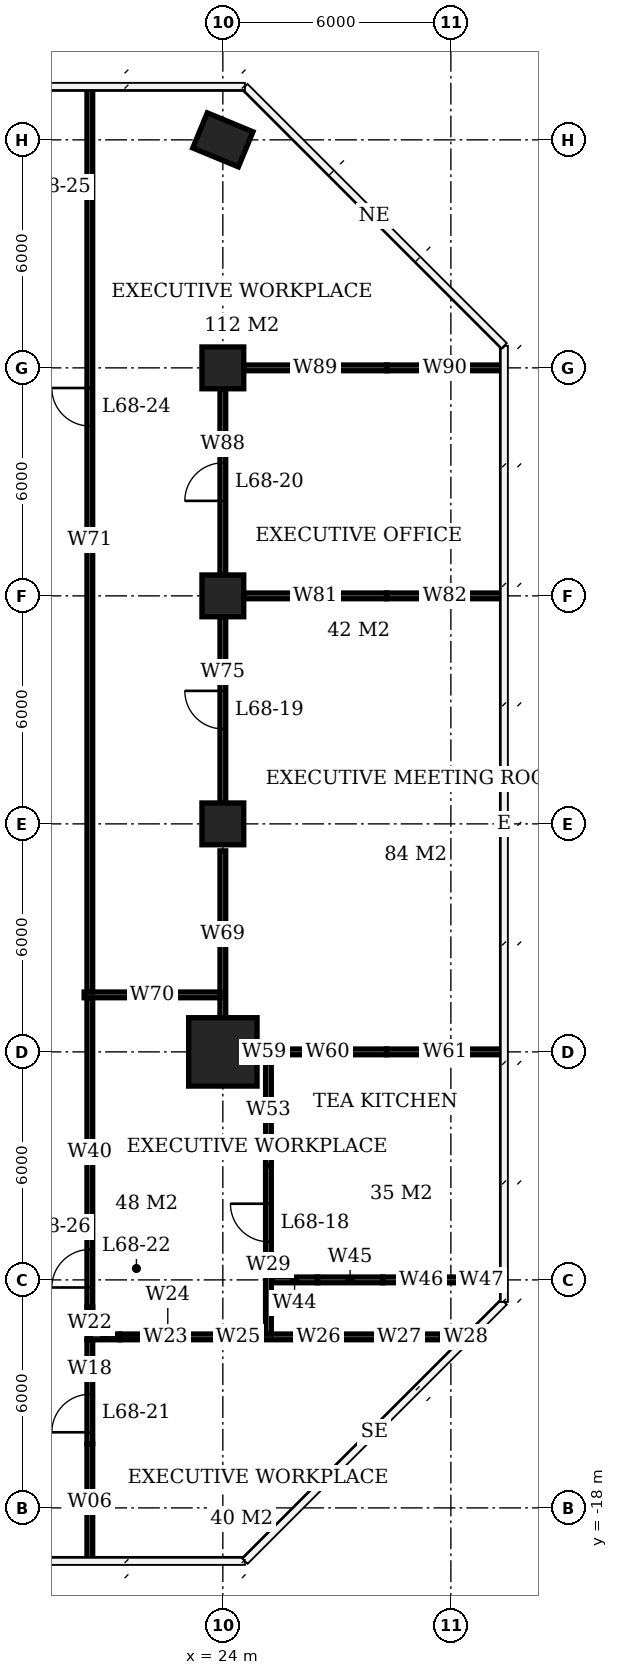
"""IFC4 building model, lengths in metres.
Left out: names, types, materials, properties, quantities, classifications, styles, units other than length and angle.
Written with IfcOpenShell. Run it as: python <this file> out.ifc"""

import sys

from ifc_helpers import new_model, si_unit, direction, frame, frame_2d, origin, origin_2d, place, context, subcontext, project, spatial, rectangle, extrude, element, fill, save


model = new_model("IFC4")
c1 = context("Model", 3, precision=1e-05, world=origin(), true_north=direction((0.0, 1.0)))
c2 = subcontext(c1, "Body", "Model", "MODEL_VIEW")
j1 = project(units=[si_unit("LENGTHUNIT", "METRE"), si_unit("PLANEANGLEUNIT", "RADIAN")], contexts=[c1])
p1 = place(None, origin())
s1 = spatial("IfcSite", under=j1, at=p1, CompositionType="ELEMENT")
p2 = place(p1, origin())
s2 = spatial("IfcBuilding", under=s1, at=p2, CompositionType="ELEMENT")
p3 = place(p2, frame((0.0, 0.0, 276.2)))
s3 = spatial("IfcBuildingStorey", under=s2, at=p3, CompositionType="ELEMENT", Elevation=276.2)
p4 = place(p3, frame((24.0, -6.0, 0.0), z_axis=(0.0, 0.0, 1.0), x_axis=(1.0, 0.0, 0.0)))
e1 = element("IfcColumn", 1, at=p4, inside=s3, PredefinedType="COLUMN", context=c2, shape_type="SweptSolid", body=[
    extrude(rectangle(XDim=1.8, YDim=1.8, at=origin_2d()), origin(), (0.0, 0.0, 1.0), 3.9),
])
for number, where, z_axis, x_axis in (
    (2, (24.0, 0.0, 0.0), (0.0, 0.0, 1.0), (1.0, 0.0, 0.0)),
    (3, (24.0, 6.0, 0.0), (0.0, 0.0, 1.0), (1.0, 0.0, 0.0)),
    (4, (24.0, 12.0, 0.0), (0.0, 0.0, 1.0), (1.0, 0.0, 0.0)),
):
    element("IfcColumn", number, at=place(p3, frame(where, z_axis=z_axis, x_axis=x_axis)), inside=s3, PredefinedType="COLUMN", context=c2, shape_type="SweptSolid", body=[
        extrude(rectangle(XDim=1.1, YDim=1.1, at=origin_2d()), origin(), (0.0, 0.0, 1.0), 3.9),
    ])
p5 = place(p3, frame((24.0, 18.0, 0.0), z_axis=(0.0, 0.0, 1.0), x_axis=(0.923879532511, -0.382683432365, 0.0)))
e5 = element("IfcColumn", 5, at=p5, inside=s3, PredefinedType="COLUMN", context=c2, shape_type="SweptSolid", body=[
    extrude(rectangle(XDim=1.3, YDim=1.0, at=origin_2d()), origin(), (0.0, 0.0, 1.0), 3.9),
])
p6 = place(p3, frame((25.285, -12.0, 0.0), z_axis=(0.0, 0.0, 1.0), x_axis=(1.0, 0.0, 0.0)))
e6 = element("IfcWall", 6, at=p6, inside=s3, PredefinedType="PARTITIONING", context=c2, shape_type="SweptSolid", body=[
    extrude(rectangle(XDim=1.205, YDim=0.15, at=frame_2d((0.603, 0.0))), origin(), (0.0, 0.0, 1.0), 2.65),
])
p7 = place(p3, frame((26.49, -12.0, 0.0), z_axis=(0.0, 0.0, 1.0), x_axis=(1.0, 0.0, 0.0)))
e7 = element("IfcWall", 7, at=p7, inside=s3, PredefinedType="PARTITIONING", context=c2, shape_type="SweptSolid", body=[
    extrude(rectangle(XDim=1.718, YDim=0.15, at=frame_2d((0.859, 0.0))), origin(), (0.0, 0.0, 1.0), 3.65),
])
p8 = place(p3, frame((28.208, -12.0, 0.0), z_axis=(0.0, 0.0, 1.0), x_axis=(1.0, 0.0, 0.0)))
e8 = element("IfcWall", 8, at=p8, inside=s3, PredefinedType="PARTITIONING", context=c2, shape_type="SweptSolid", body=[
    extrude(rectangle(XDim=2.029, YDim=0.15, at=frame_2d((1.015, 0.0))), origin(), (0.0, 0.0, 1.0), 2.65),
])
p9 = place(p3, frame((30.237, -12.0, 0.0), z_axis=(0.0, 0.0, 1.0), x_axis=(1.0, 0.0, 0.0)))
e9 = element("IfcWall", 9, at=p9, inside=s3, PredefinedType="PARTITIONING", context=c2, shape_type="SweptSolid", body=[
    extrude(rectangle(XDim=1.138, YDim=0.15, at=frame_2d((0.569, 0.0))), origin(), (0.0, 0.0, 1.0), 3.65),
])
p10 = place(p3, frame((24.9, -6.0, 0.0), z_axis=(0.0, 0.0, 1.0), x_axis=(1.0, 0.0, 0.0)))
e10 = element("IfcWall", 10, at=p10, inside=s3, PredefinedType="PARTITIONING", context=c2, shape_type="SweptSolid", body=[
    extrude(rectangle(XDim=0.375, YDim=0.15, at=frame_2d((0.188, 0.0))), origin(), (0.0, 0.0, 1.0), 2.65),
])
p11 = place(p3, frame((25.2, -6.0, 0.0), z_axis=(0.0, 0.0, 1.0), x_axis=(1.0, 0.0, 0.0)))
e11 = element("IfcWall", 11, at=p11, inside=s3, PredefinedType="PARTITIONING", context=c2, shape_type="SweptSolid", body=[
    extrude(rectangle(XDim=3.11, YDim=0.15, at=frame_2d((1.555, 0.0))), origin(), (0.0, 0.0, 1.0), 2.65),
])
p12 = place(p3, frame((28.31, -6.0, 0.0), z_axis=(0.0, 0.0, 1.0), x_axis=(1.0, 0.0, 0.0)))
e12 = element("IfcWall", 12, at=p12, inside=s3, PredefinedType="PARTITIONING", context=c2, shape_type="SweptSolid", body=[
    extrude(rectangle(XDim=3.065, YDim=0.15, at=frame_2d((1.532, 0.0))), origin(), (0.0, 0.0, 1.0), 3.65),
])
p13 = place(p3, frame((24.55, 6.0, 0.0), z_axis=(0.0, 0.0, 1.0), x_axis=(1.0, 0.0, 0.0)))
e13 = element("IfcWall", 13, at=p13, inside=s3, PredefinedType="PARTITIONING", context=c2, shape_type="SweptSolid", body=[
    extrude(rectangle(XDim=3.76, YDim=0.15, at=frame_2d((1.88, 0.0))), origin(), (0.0, 0.0, 1.0), 2.65),
])
p14 = place(p3, frame((28.31, 6.0, 0.0), z_axis=(0.0, 0.0, 1.0), x_axis=(1.0, 0.0, 0.0)))
e14 = element("IfcWall", 14, at=p14, inside=s3, PredefinedType="PARTITIONING", context=c2, shape_type="SweptSolid", body=[
    extrude(rectangle(XDim=3.065, YDim=0.15, at=frame_2d((1.532, 0.0))), origin(), (0.0, 0.0, 1.0), 3.65),
])
p15 = place(p3, frame((24.55, 12.0, 0.0), z_axis=(0.0, 0.0, 1.0), x_axis=(1.0, 0.0, 0.0)))
e15 = element("IfcWall", 15, at=p15, inside=s3, PredefinedType="PARTITIONING", context=c2, shape_type="SweptSolid", body=[
    extrude(rectangle(XDim=3.76, YDim=0.15, at=frame_2d((1.88, 0.0))), origin(), (0.0, 0.0, 1.0), 2.65),
])
p16 = place(p3, frame((28.31, 12.0, 0.0), z_axis=(0.0, 0.0, 1.0), x_axis=(1.0, 0.0, 0.0)))
e16 = element("IfcWall", 16, at=p16, inside=s3, PredefinedType="PARTITIONING", context=c2, shape_type="SweptSolid", body=[
    extrude(rectangle(XDim=3.065, YDim=0.15, at=frame_2d((1.532, 0.0))), origin(), (0.0, 0.0, 1.0), 3.65),
])
p17 = place(p3, frame((24.0, -5.1, 0.0), z_axis=(0.0, 0.0, 1.0), x_axis=(0.0, 1.0, 0.0)))
e17 = element("IfcWall", 17, at=p17, inside=s3, PredefinedType="PARTITIONING", context=c2, shape_type="SweptSolid", body=[
    extrude(rectangle(XDim=4.39, YDim=0.15, at=frame_2d((2.195, 0.0))), origin(), (0.0, 0.0, 1.0), 3.65),
])
p18 = place(p3, frame((24.0, 0.56, 0.0), z_axis=(0.0, 0.0, 1.0), x_axis=(0.0, 1.0, 0.0)))
e18 = element("IfcWall", 18, at=p18, inside=s3, PredefinedType="PARTITIONING", context=c2, shape_type="SweptSolid", body=[
    extrude(rectangle(XDim=4.88, YDim=0.15, at=frame_2d((2.44, 0.0))), origin(), (0.0, 0.0, 1.0), 3.65),
])
p19 = place(p18, frame((1.94, 0.0, 0.0)))
e19 = element("IfcOpeningElement", 19, at=p19, cuts=e18, PredefinedType="OPENING", context=c2, shape_type="SweptSolid", body=[
    extrude(rectangle(XDim=1.0, YDim=2.4, at=frame_2d((0.5, 1.2))), frame((0.0, 0.085, 0.0), z_axis=(0.0, -1.0, 0.0), x_axis=(1.0, 0.0, 0.0)), (0.0, 0.0, 1.0), 0.17),
])
p20 = place(p3, frame((24.0, 6.56, 0.0), z_axis=(0.0, 0.0, 1.0), x_axis=(0.0, 1.0, 0.0)))
e20 = element("IfcWall", 20, at=p20, inside=s3, PredefinedType="PARTITIONING", context=c2, shape_type="SweptSolid", body=[
    extrude(rectangle(XDim=4.88, YDim=0.15, at=frame_2d((2.44, 0.0))), origin(), (0.0, 0.0, 1.0), 3.65),
])
p21 = place(p20, frame((1.94, 0.0, 0.0)))
e21 = element("IfcOpeningElement", 21, at=p21, cuts=e20, PredefinedType="OPENING", context=c2, shape_type="SweptSolid", body=[
    extrude(rectangle(XDim=1.0, YDim=2.4, at=frame_2d((0.5, 1.2))), frame((0.0, 0.085, 0.0), z_axis=(0.0, -1.0, 0.0), x_axis=(1.0, 0.0, 0.0)), (0.0, 0.0, 1.0), 0.17),
])
p22 = place(p3, frame((25.2, -13.425, 0.0), z_axis=(0.0, 0.0, 1.0), x_axis=(0.0, 1.0, 0.0)))
e22 = element("IfcWall", 22, at=p22, inside=s3, PredefinedType="PARTITIONING", context=c2, shape_type="SweptSolid", body=[
    extrude(rectangle(XDim=4.433, YDim=0.15, at=frame_2d((2.216, 0.0))), origin(), (0.0, 0.0, 1.0), 3.65),
])
p23 = place(p22, frame((2.429, 0.0, 0.0)))
e23 = element("IfcOpeningElement", 23, at=p23, cuts=e22, PredefinedType="OPENING", context=c2, shape_type="SweptSolid", body=[
    extrude(rectangle(XDim=1.0, YDim=2.4, at=frame_2d((0.5, 1.2))), frame((0.0, 0.085, 0.0), z_axis=(0.0, -1.0, 0.0), x_axis=(1.0, 0.0, 0.0)), (0.0, 0.0, 1.0), 0.17),
])
p24 = place(p3, frame((25.2, -8.992, 0.0), z_axis=(0.0, 0.0, 1.0), x_axis=(0.0, 1.0, 0.0)))
e24 = element("IfcWall", 24, at=p24, inside=s3, PredefinedType="PARTITIONING", context=c2, shape_type="SweptSolid", body=[
    extrude(rectangle(XDim=2.917, YDim=0.15, at=frame_2d((1.458, 0.0))), origin(), (0.0, 0.0, 1.0), 2.65),
])
p25 = place(p3, frame((20.5, -19.375, 0.0), z_axis=(0.0, 0.0, 1.0), x_axis=(0.0, 1.0, 0.0)))
e25 = element("IfcWall", 25, at=p25, inside=s3, PredefinedType="PARTITIONING", context=c2, shape_type="SweptSolid", body=[
    extrude(rectangle(XDim=3.065, YDim=0.15, at=frame_2d((1.532, 0.0))), origin(), (0.0, 0.0, 1.0), 3.65),
])
p26 = place(p3, frame((20.5, -16.31, 0.0), z_axis=(0.0, 0.0, 1.0), x_axis=(0.0, 1.0, 0.0)))
e26 = element("IfcWall", 26, at=p26, inside=s3, PredefinedType="PARTITIONING", context=c2, shape_type="SweptSolid", body=[
    extrude(rectangle(XDim=2.735, YDim=0.15, at=frame_2d((1.368, 0.0))), origin(), (0.0, 0.0, 1.0), 2.65),
])
p27 = place(p26, frame((0.3, 0.0, 0.0)))
e27 = element("IfcOpeningElement", 27, at=p27, cuts=e26, PredefinedType="OPENING", context=c2, shape_type="SweptSolid", body=[
    extrude(rectangle(XDim=1.0, YDim=2.4, at=frame_2d((0.5, 1.2))), frame((0.0, 0.085, 0.0), z_axis=(0.0, -1.0, 0.0), x_axis=(1.0, 0.0, 0.0)), (0.0, 0.0, 1.0), 0.17),
])
p28 = place(p3, frame((20.5, -13.575, 0.0), z_axis=(0.0, 0.0, 1.0), x_axis=(0.0, 1.0, 0.0)))
e28 = element("IfcWall", 28, at=p28, inside=s3, PredefinedType="PARTITIONING", context=c2, shape_type="SweptSolid", body=[
    extrude(rectangle(XDim=0.867, YDim=0.15, at=frame_2d((0.434, 0.0))), origin(), (0.0, 0.0, 1.0), 2.65),
])
p29 = place(p3, frame((20.5, -12.708, 0.0), z_axis=(0.0, 0.0, 1.0), x_axis=(0.0, 1.0, 0.0)))
e29 = element("IfcWall", 29, at=p29, inside=s3, PredefinedType="PARTITIONING", context=c2, shape_type="SweptSolid", body=[
    extrude(rectangle(XDim=8.133, YDim=0.15, at=frame_2d((4.066, 0.0))), origin(), (0.0, 0.0, 1.0), 3.65),
])
p30 = place(p29, frame((0.508, 0.0, 0.0)))
e30 = element("IfcOpeningElement", 30, at=p30, cuts=e29, PredefinedType="OPENING", context=c2, shape_type="SweptSolid", body=[
    extrude(rectangle(XDim=1.0, YDim=2.4, at=frame_2d((0.5, 1.2))), frame((0.0, 0.085, 0.0), z_axis=(0.0, -1.0, 0.0), x_axis=(1.0, 0.0, 0.0)), (0.0, 0.0, 1.0), 0.17),
])
p31 = place(p3, frame((20.5, -13.5, 0.0), z_axis=(0.0, 0.0, 1.0), x_axis=(1.0, 0.0, 0.0)))
e31 = element("IfcWall", 31, at=p31, inside=s3, PredefinedType="PARTITIONING", context=c2, shape_type="SweptSolid", body=[
    extrude(rectangle(XDim=0.792, YDim=0.15, at=frame_2d((0.396, 0.0))), origin(), (0.0, 0.0, 1.0), 2.65),
])
p32 = place(p3, frame((21.292, -13.5, 0.0), z_axis=(0.0, 0.0, 1.0), x_axis=(1.0, 0.0, 0.0)))
e32 = element("IfcWall", 32, at=p32, inside=s3, PredefinedType="PARTITIONING", context=c2, shape_type="SweptSolid", body=[
    extrude(rectangle(XDim=2.518, YDim=0.15, at=frame_2d((1.259, 0.0))), origin(), (0.0, 0.0, 1.0), 3.65),
])
p33 = place(p3, frame((23.81, -13.5, 0.0), z_axis=(0.0, 0.0, 1.0), x_axis=(1.0, 0.0, 0.0)))
e33 = element("IfcWall", 33, at=p33, inside=s3, PredefinedType="PARTITIONING", context=c2, shape_type="SweptSolid", body=[
    extrude(rectangle(XDim=1.18, YDim=0.15, at=frame_2d((0.59, 0.0))), origin(), (0.0, 0.0, 1.0), 2.65),
])
p34 = place(p3, frame((24.99, -13.5, 0.0), z_axis=(0.0, 0.0, 1.0), x_axis=(1.0, 0.0, 0.0)))
e34 = element("IfcWall", 34, at=p34, inside=s3, PredefinedType="PARTITIONING", context=c2, shape_type="SweptSolid", body=[
    extrude(rectangle(XDim=3.062, YDim=0.15, at=frame_2d((1.531, 0.0))), origin(), (0.0, 0.0, 1.0), 3.65),
])
p35 = place(p3, frame((28.052, -13.5, 0.0), z_axis=(0.0, 0.0, 1.0), x_axis=(1.0, 0.0, 0.0)))
e35 = element("IfcWall", 35, at=p35, inside=s3, PredefinedType="PARTITIONING", context=c2, shape_type="SweptSolid", body=[
    extrude(rectangle(XDim=1.18, YDim=0.15, at=frame_2d((0.59, 0.0))), origin(), (0.0, 0.0, 1.0), 2.65),
])
p36 = place(p3, frame((29.232, -13.5, 0.0), z_axis=(0.0, 0.0, 1.0), x_axis=(1.0, 0.0, 0.0)))
e36 = element("IfcWall", 36, at=p36, inside=s3, PredefinedType="PARTITIONING", context=c2, shape_type="SweptSolid", body=[
    extrude(rectangle(XDim=1.131, YDim=0.15, at=frame_2d((0.565, 0.0))), origin(), (0.0, 0.0, 1.0), 3.65),
])
p37 = place(p3, frame((20.5, -4.425, 0.0), z_axis=(0.0, 0.0, 1.0), x_axis=(0.0, 1.0, 0.0)))
e37 = element("IfcWall", 37, at=p37, inside=s3, PredefinedType="PARTITIONING", context=c2, shape_type="SweptSolid", body=[
    extrude(rectangle(XDim=23.8, YDim=0.15, at=frame_2d((11.9, 0.0))), origin(), (0.0, 0.0, 1.0), 3.65),
])
p38 = place(p37, frame((14.895, 0.0, 0.0)))
e38 = element("IfcOpeningElement", 38, at=p38, cuts=e37, PredefinedType="OPENING", context=c2, shape_type="SweptSolid", body=[
    extrude(rectangle(XDim=1.0, YDim=2.4, at=frame_2d((0.5, 1.2))), frame((0.0, 0.085, 0.0), z_axis=(0.0, -1.0, 0.0), x_axis=(1.0, 0.0, 0.0)), (0.0, 0.0, 1.0), 0.17),
])
p39 = place(p3, frame((20.35, -4.5, 0.0), z_axis=(0.0, 0.0, 1.0), x_axis=(1.0, 0.0, 0.0)))
e39 = element("IfcWall", 39, at=p39, inside=s3, PredefinedType="PARTITIONING", context=c2, shape_type="SweptSolid", body=[
    extrude(rectangle(XDim=3.575, YDim=0.15, at=frame_2d((1.788, 0.0))), origin(), (0.0, 0.0, 1.0), 3.65),
])
p40 = place(p23, origin())
e40 = element("IfcDoor", 40, at=p40, inside=s3, OperationType="SINGLE_SWING_RIGHT", PredefinedType="DOOR", context=c2, shape_type="SweptSolid", body=[
    extrude(rectangle(XDim=1.0, YDim=2.4, at=frame_2d((0.5, 1.2))), frame((0.0, 0.025, 0.0), z_axis=(0.0, -1.0, 0.0), x_axis=(1.0, 0.0, 0.0)), (0.0, 0.0, 1.0), 0.05),
])
fill(e23, e40)
p41 = place(p19, origin())
e41 = element("IfcDoor", 41, at=p41, inside=s3, OperationType="SINGLE_SWING_RIGHT", PredefinedType="DOOR", context=c2, shape_type="SweptSolid", body=[
    extrude(rectangle(XDim=1.0, YDim=2.4, at=frame_2d((0.5, 1.2))), frame((0.0, 0.025, 0.0), z_axis=(0.0, -1.0, 0.0), x_axis=(1.0, 0.0, 0.0)), (0.0, 0.0, 1.0), 0.05),
])
fill(e19, e41)
p42 = place(p21, origin())
e42 = element("IfcDoor", 42, at=p42, inside=s3, OperationType="SINGLE_SWING_LEFT", PredefinedType="DOOR", context=c2, shape_type="SweptSolid", body=[
    extrude(rectangle(XDim=1.0, YDim=2.4, at=frame_2d((0.5, 1.2))), frame((0.0, 0.025, 0.0), z_axis=(0.0, -1.0, 0.0), x_axis=(1.0, 0.0, 0.0)), (0.0, 0.0, 1.0), 0.05),
])
fill(e21, e42)
p43 = place(p27, origin())
e43 = element("IfcDoor", 43, at=p43, inside=s3, OperationType="SINGLE_SWING_LEFT", PredefinedType="DOOR", context=c2, shape_type="SweptSolid", body=[
    extrude(rectangle(XDim=1.0, YDim=2.4, at=frame_2d((0.5, 1.2))), frame((0.0, 0.025, 0.0), z_axis=(0.0, -1.0, 0.0), x_axis=(1.0, 0.0, 0.0)), (0.0, 0.0, 1.0), 0.05),
])
fill(e27, e43)
p44 = place(p30, origin())
e44 = element("IfcDoor", 44, at=p44, inside=s3, OperationType="SINGLE_SWING_LEFT", PredefinedType="DOOR", context=c2, shape_type="SweptSolid", body=[
    extrude(rectangle(XDim=1.0, YDim=2.4, at=frame_2d((0.5, 1.2))), frame((0.0, 0.025, 0.0), z_axis=(0.0, -1.0, 0.0), x_axis=(1.0, 0.0, 0.0)), (0.0, 0.0, 1.0), 0.05),
])
fill(e30, e44)
p45 = place(p38, origin())
e45 = element("IfcDoor", 45, at=p45, inside=s3, OperationType="SINGLE_SWING_RIGHT", PredefinedType="DOOR", context=c2, shape_type="SweptSolid", body=[
    extrude(rectangle(XDim=1.0, YDim=2.4, at=frame_2d((0.5, 1.2))), frame((0.0, 0.025, 0.0), z_axis=(0.0, -1.0, 0.0), x_axis=(1.0, 0.0, 0.0)), (0.0, 0.0, 1.0), 0.05),
])
fill(e38, e45)
save(model, sys.argv[1])
